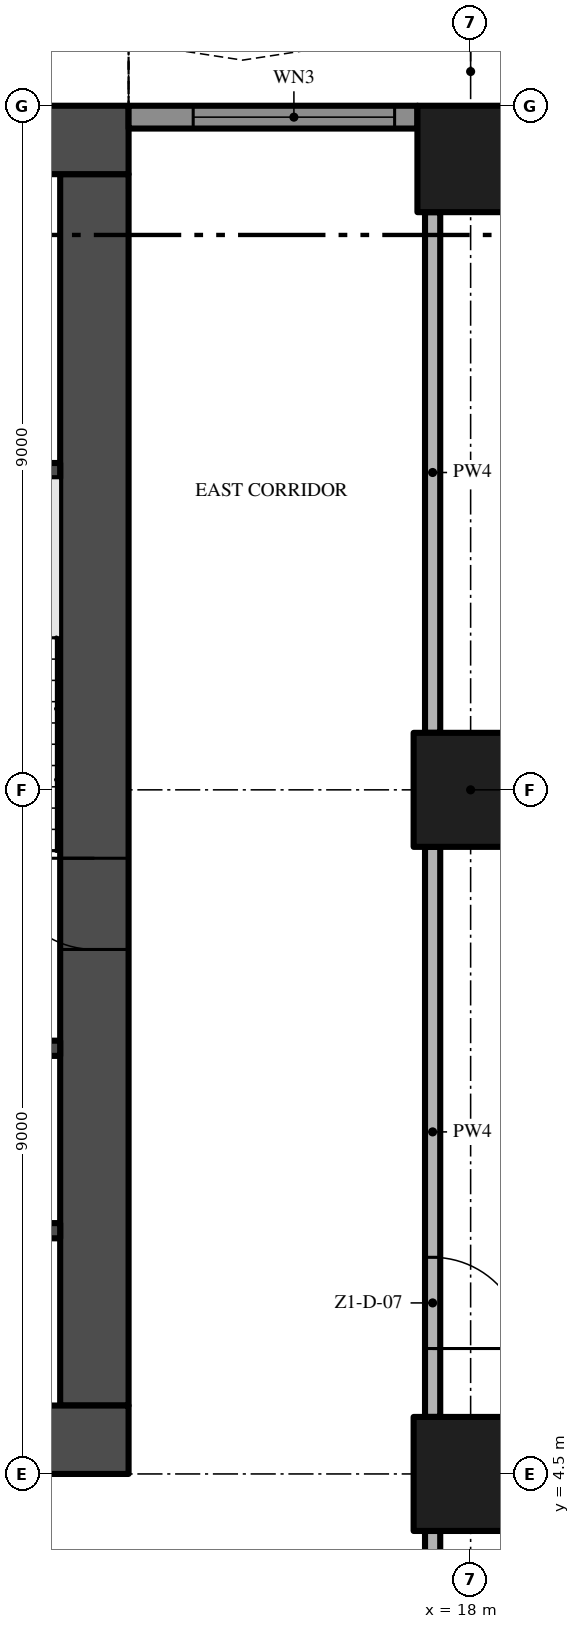
"""IFC4 building model, lengths in metres.
Left out: names, types, materials, properties, quantities, classifications, styles, units other than length and angle.
Written with IfcOpenShell. Run it as: python <this file> out.ifc"""

import sys

from ifc_helpers import new_model, si_unit, direction, frame, frame_2d, origin, origin_2d, place, context, subcontext, project, spatial, polyline, rectangle, outline, extrude, element, fill, save


model = new_model("IFC4")
c1 = context("Model", 3, precision=1e-05, world=origin(), true_north=direction((0.0, 1.0)))
c2 = subcontext(c1, "Body", "Model", "MODEL_VIEW")
j1 = project(units=[si_unit("LENGTHUNIT", "METRE"), si_unit("PLANEANGLEUNIT", "RADIAN")], contexts=[c1])
p1 = place(None, origin())
s1 = spatial("IfcSite", under=j1, at=p1, CompositionType="ELEMENT")
p2 = place(p1, origin())
s2 = spatial("IfcBuilding", under=s1, at=p2, CompositionType="ELEMENT")
p3 = place(p2, frame((0.0, 0.0, 53.0)))
s3 = spatial("IfcBuildingStorey", under=s2, at=p3, CompositionType="ELEMENT", Elevation=53.0)
p4 = place(p3, frame((-13.5, 4.95, -0.3), z_axis=(0.0, 0.0, 1.0), x_axis=(1.0, 0.0, 0.0)))
e1 = element("IfcWall", 1, at=p4, inside=s3, PredefinedType="SHEAR", context=c2, shape_type="SweptSolid", body=[
    extrude(rectangle(XDim=27.0, YDim=0.9, at=frame_2d((13.5, 0.0))), origin(), (0.0, 0.0, 1.0), 3.8),
])
p5 = place(p4, frame((12.0, 0.0, 0.3)))
e2 = element("IfcOpeningElement", 2, at=p5, cuts=e1, PredefinedType="OPENING", context=c2, shape_type="SweptSolid", body=[
    extrude(rectangle(XDim=3.0, YDim=2.4, at=frame_2d((1.5, 1.2))), frame((0.0, 0.46, 0.0), z_axis=(0.0, -1.0, 0.0), x_axis=(1.0, 0.0, 0.0)), (0.0, 0.0, 1.0), 0.92),
])
p6 = place(p4, frame((4.9, 0.0, 0.3)))
e3 = element("IfcOpeningElement", 3, at=p6, cuts=e1, PredefinedType="OPENING", context=c2, shape_type="SweptSolid", body=[
    extrude(rectangle(XDim=1.2, YDim=2.2, at=frame_2d((0.6, 1.1))), frame((0.0, 0.46, 0.0), z_axis=(0.0, -1.0, 0.0), x_axis=(1.0, 0.0, 0.0)), (0.0, 0.0, 1.0), 0.92),
])
p7 = place(p4, frame((20.75, 0.0, 0.3)))
e4 = element("IfcOpeningElement", 4, at=p7, cuts=e1, PredefinedType="OPENING", context=c2, shape_type="SweptSolid", body=[
    extrude(rectangle(XDim=1.5, YDim=2.2, at=frame_2d((0.75, 1.1))), frame((0.0, 0.46, 0.0), z_axis=(0.0, -1.0, 0.0), x_axis=(1.0, 0.0, 0.0)), (0.0, 0.0, 1.0), 0.92),
])
p8 = place(p4, frame((17.4, 0.0, 0.3)))
e5 = element("IfcOpeningElement", 5, at=p8, cuts=e1, PredefinedType="OPENING", context=c2, shape_type="SweptSolid", body=[
    extrude(rectangle(XDim=1.2, YDim=2.2, at=frame_2d((0.6, 1.1))), frame((0.0, 0.46, 0.0), z_axis=(0.0, -1.0, 0.0), x_axis=(1.0, 0.0, 0.0)), (0.0, 0.0, 1.0), 0.92),
])
p9 = place(p3, frame((13.05, 5.4, -0.3), z_axis=(0.0, 0.0, 1.0), x_axis=(0.0, 1.0, 0.0)))
e6 = element("IfcWall", 6, at=p9, inside=s3, PredefinedType="SHEAR", context=c2, shape_type="SweptSolid", body=[
    extrude(rectangle(XDim=16.2, YDim=0.9, at=frame_2d((8.1, 0.0))), origin(), (0.0, 0.0, 1.0), 3.8),
])
p10 = place(p9, frame((6.0, 0.0, 0.3)))
e7 = element("IfcOpeningElement", 7, at=p10, cuts=e6, PredefinedType="OPENING", context=c2, shape_type="SweptSolid", body=[
    extrude(rectangle(XDim=1.2, YDim=2.2, at=frame_2d((0.6, 1.1))), frame((0.0, 0.46, 0.0), z_axis=(0.0, -1.0, 0.0), x_axis=(1.0, 0.0, 0.0)), (0.0, 0.0, 1.0), 0.92),
])
p11 = place(p3, frame((13.5, 22.05, -0.3), z_axis=(0.0, 0.0, 1.0), x_axis=(-1.0, 0.0, 0.0)))
e8 = element("IfcWall", 8, at=p11, inside=s3, PredefinedType="SHEAR", context=c2, shape_type="SweptSolid", body=[
    extrude(rectangle(XDim=27.0, YDim=0.9, at=frame_2d((13.5, 0.0))), origin(), (0.0, 0.0, 1.0), 3.8),
])
p12 = place(p3, frame((18.0, 13.5, 0.0), z_axis=(0.0, 0.0, 1.0), x_axis=(1.0, 0.0, 0.0)))
e9 = element("IfcColumn", 9, at=p12, inside=s3, PredefinedType="COLUMN", context=c2, shape_type="SweptSolid", body=[
    extrude(rectangle(XDim=1.5, YDim=1.5, at=origin_2d()), origin(), (0.0, 0.0, 1.0), 3.5),
])
p13 = place(p3, frame((18.0, 21.8, 0.0), z_axis=(0.0, 0.0, 1.0), x_axis=(1.0, 0.0, 0.0)))
e10 = element("IfcColumn", 10, at=p13, inside=s3, PredefinedType="COLUMN", context=c2, shape_type="SweptSolid", body=[
    extrude(rectangle(XDim=1.4, YDim=1.4, at=origin_2d()), origin(), (0.0, 0.0, 1.0), 3.5),
])
p14 = place(p3, frame((18.0, 4.5, 0.0), z_axis=(0.0, 0.0, 1.0), x_axis=(1.0, 0.0, 0.0)))
e11 = element("IfcColumn", 11, at=p14, inside=s3, PredefinedType="COLUMN", context=c2, shape_type="SweptSolid", body=[
    extrude(rectangle(XDim=1.5, YDim=1.5, at=origin_2d()), origin(), (0.0, 0.0, 1.0), 3.5),
])
p15 = place(p3, frame((13.5, 22.35, 0.0), z_axis=(0.0, 0.0, 1.0), x_axis=(1.0, 0.0, 0.0)))
e12 = element("IfcWall", 12, at=p15, inside=s3, PredefinedType="SOLIDWALL", context=c2, shape_type="SweptSolid", body=[
    extrude(rectangle(XDim=3.8, YDim=0.3, at=frame_2d((1.9, 0.0))), origin(), (0.0, 0.0, 1.0), 3.5),
])
p16 = place(p15, frame((0.85, 0.0, 0.45)))
e13 = element("IfcOpeningElement", 13, at=p16, cuts=e12, PredefinedType="OPENING", context=c2, shape_type="SweptSolid", body=[
    extrude(rectangle(XDim=2.65, YDim=2.65, at=frame_2d((1.325, 1.325))), frame((0.0, 0.16, 0.0), z_axis=(0.0, -1.0, 0.0), x_axis=(1.0, 0.0, 0.0)), (0.0, 0.0, 1.0), 0.32),
])
p17 = place(p3, origin())
e14 = element("IfcWall", 14, at=p17, inside=s3, PredefinedType="USERDEFINED", context=c2, shape_type="SweptSolid", body=[
    extrude(outline(polyline([(22.5, 25.5), (21.0, 25.271), (19.5, 24.671), (18.0, 23.929), (16.5, 23.329), (15.0, 23.1), (13.5, 23.329), (13.462, 23.082), (15.0, 22.847), (16.566, 23.086), (18.102, 23.701), (19.602, 24.442), (21.066, 25.028), (22.538, 25.253), (22.5, 25.5)])), origin(), (0.0, 0.0, 1.0), 0.9),
])
for number, where, z_axis, x_axis in (
    (15, (9.65, 7.7, 0.0), (0.0, 0.0, 1.0), (1.0, 0.0, 0.0)),
    (16, (9.65, 10.1, 0.0), (0.0, 0.0, 1.0), (1.0, 0.0, 0.0)),
    (17, (9.65, 17.7, 0.0), (0.0, 0.0, 1.0), (1.0, 0.0, 0.0)),
):
    element("IfcWall", number, at=place(p3, frame(where, z_axis=z_axis, x_axis=x_axis)), inside=s3, PredefinedType="SHEAR", context=c2, shape_type="SweptSolid", body=[
        extrude(rectangle(XDim=2.95, YDim=0.2, at=frame_2d((1.475, 0.0))), origin(), (0.0, 0.0, 1.0), 3.5),
    ])
p18 = place(p3, frame((17.5, -0.2, 0.0), z_axis=(0.0, 0.0, 1.0), x_axis=(0.0, 1.0, 0.0)))
e18 = element("IfcWall", 18, at=p18, inside=s3, PredefinedType="PARTITIONING", context=c2, shape_type="SweptSolid", body=[
    extrude(rectangle(XDim=3.95, YDim=0.2, at=frame_2d((1.975, 0.0))), origin(), (0.0, 0.0, 1.0), 3.5),
])
p19 = place(p3, frame((17.5, 12.75, 0.0), z_axis=(0.0, 0.0, 1.0), x_axis=(0.0, -1.0, 0.0)))
e19 = element("IfcWall", 19, at=p19, inside=s3, PredefinedType="PARTITIONING", context=c2, shape_type="SweptSolid", body=[
    extrude(rectangle(XDim=7.5, YDim=0.2, at=frame_2d((3.75, 0.0))), origin(), (0.0, 0.0, 1.0), 3.5),
])
p20 = place(p19, frame((5.4, 0.0, 0.0)))
e20 = element("IfcOpeningElement", 20, at=p20, cuts=e19, PredefinedType="OPENING", context=c2, shape_type="SweptSolid", body=[
    extrude(rectangle(XDim=1.2, YDim=2.4, at=frame_2d((0.6, 1.2))), frame((0.0, 0.11, 0.0), z_axis=(0.0, -1.0, 0.0), x_axis=(1.0, 0.0, 0.0)), (0.0, 0.0, 1.0), 0.22),
])
p21 = place(p3, frame((17.5, 14.25, 0.0), z_axis=(0.0, 0.0, 1.0), x_axis=(0.0, 1.0, 0.0)))
e21 = element("IfcWall", 21, at=p21, inside=s3, PredefinedType="PARTITIONING", context=c2, shape_type="SweptSolid", body=[
    extrude(rectangle(XDim=6.85, YDim=0.2, at=frame_2d((3.425, 0.0))), origin(), (0.0, 0.0, 1.0), 3.5),
])
p22 = place(p16, origin())
e22 = element("IfcWindow", 22, at=p22, inside=s3, PartitioningType="SINGLE_PANEL", PredefinedType="WINDOW", context=c2, shape_type="SweptSolid", body=[
    extrude(rectangle(XDim=2.65, YDim=2.65, at=frame_2d((1.325, 1.325))), frame((0.0, 0.03, 0.0), z_axis=(0.0, -1.0, 0.0), x_axis=(1.0, 0.0, 0.0)), (0.0, 0.0, 1.0), 0.06),
])
fill(e13, e22)
p23 = place(p10, frame((1.2, 0.0, 0.0), z_axis=(0.0, 0.0, 1.0), x_axis=(-1.0, 0.0, 0.0)))
e23 = element("IfcDoor", 23, at=p23, inside=s3, OperationType="SINGLE_SWING_LEFT", PredefinedType="DOOR", context=c2, shape_type="SweptSolid", body=[
    extrude(rectangle(XDim=1.2, YDim=2.2, at=frame_2d((0.6, 1.1))), frame((0.0, 0.025, 0.0), z_axis=(0.0, -1.0, 0.0), x_axis=(1.0, 0.0, 0.0)), (0.0, 0.0, 1.0), 0.05),
])
fill(e7, e23)
p24 = place(p20, origin())
e24 = element("IfcDoor", 24, at=p24, inside=s3, OperationType="SINGLE_SWING_RIGHT", PredefinedType="DOOR", context=c2, shape_type="SweptSolid", body=[
    extrude(rectangle(XDim=1.2, YDim=2.4, at=frame_2d((0.6, 1.2))), frame((0.0, 0.025, 0.0), z_axis=(0.0, -1.0, 0.0), x_axis=(1.0, 0.0, 0.0)), (0.0, 0.0, 1.0), 0.05),
])
fill(e20, e24)
save(model, sys.argv[1])
